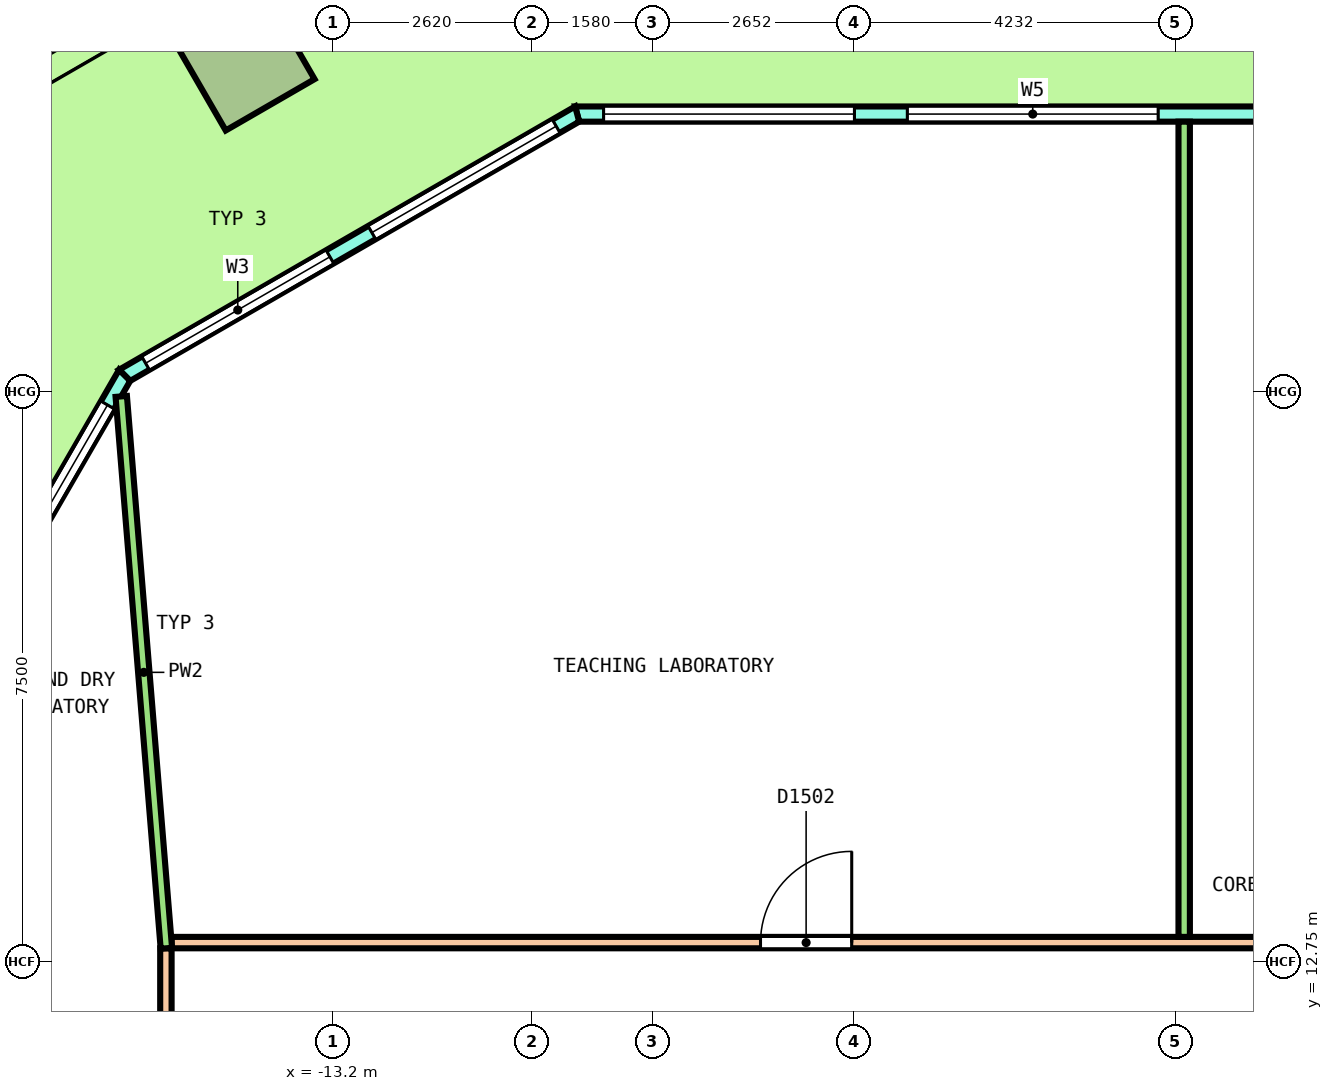
"""IFC4 building model, lengths in metres.
Left out: names, types, materials, properties, quantities, classifications, styles, units other than length and angle.
Written with IfcOpenShell. Run it as: python <this file> out.ifc"""

import sys

from ifc_helpers import new_model, si_unit, direction, frame, frame_2d, origin, origin_2d, place, context, subcontext, project, spatial, polyline, rectangle, outline, extrude, element, fill, save


model = new_model("IFC4")
c1 = context("Model", 3, precision=1e-05, world=origin(), true_north=direction((0.0, 1.0)))
c2 = subcontext(c1, "Body", "Model", "MODEL_VIEW")
j1 = project(units=[si_unit("LENGTHUNIT", "METRE"), si_unit("PLANEANGLEUNIT", "RADIAN")], contexts=[c1])
p1 = place(None, origin())
s1 = spatial("IfcSite", under=j1, at=p1, CompositionType="ELEMENT")
p2 = place(p1, origin())
s2 = spatial("IfcBuilding", under=s1, at=p2, CompositionType="ELEMENT")
p3 = place(p2, frame((0.0, 0.0, 85.2)))
s3 = spatial("IfcBuildingStorey", under=s2, at=p3, CompositionType="ELEMENT", Elevation=85.2)
p4 = place(p3, frame((-14.366, 24.606, 0.0), z_axis=(-0.036205074038, 0.0, 0.999344381389), x_axis=(-0.865315435316, -0.500246354177, -0.031349362627)))
e1 = element("IfcColumn", 1, at=p4, inside=s3, PredefinedType="COLUMN", context=c2, shape_type="SweptSolid", body=[
    extrude(rectangle(XDim=1.35, YDim=1.35, at=origin_2d()), origin(), (0.0, 0.0, 1.0), 4.053),
])
p5 = place(p3, frame((9.989, 23.9, 0.0), z_axis=(0.0, 0.0, 1.0), x_axis=(-1.0, 0.0, 0.0)))
e2 = element("IfcWall", 2, at=p5, inside=s3, PredefinedType="SOLIDWALL", context=c2, shape_type="SweptSolid", body=[
    extrude(outline(polyline([(-0.027, -0.1), (1.028, -0.1), (2.082, -0.1), (3.136, -0.1), (4.19, -0.1), (5.245, -0.1), (6.299, -0.1), (7.354, -0.1), (8.408, -0.1), (9.462, -0.1), (10.516, -0.1), (11.571, -0.1), (12.625, -0.1), (13.679, -0.1), (14.734, -0.1), (15.788, -0.1), (16.842, -0.1), (17.897, -0.1), (18.951, -0.1), (20.005, -0.1), (19.952, 0.1), (18.903, 0.1), (17.854, 0.1), (16.806, 0.1), (15.757, 0.1), (14.708, 0.1), (13.66, 0.1), (12.611, 0.1), (11.562, 0.1), (10.514, 0.1), (9.465, 0.1), (8.416, 0.1), (7.368, 0.1), (6.319, 0.1), (5.27, 0.1), (4.221, 0.1), (3.173, 0.1), (2.124, 0.1), (1.075, 0.1), (0.027, 0.1), (-0.027, -0.1)])), origin(), (0.0, 0.0, 1.0), 4.1),
])
p6 = place(p5, frame((0.348, 0.0, 0.1)))
e3 = element("IfcOpeningElement", 3, at=p6, cuts=e2, PredefinedType="OPENING", context=c2, shape_type="SweptSolid", body=[
    extrude(rectangle(XDim=3.3, YDim=2.9, at=frame_2d((1.65, 1.45))), frame((0.0, 0.11, 0.0), z_axis=(0.0, -1.0, 0.0), x_axis=(1.0, 0.0, 0.0)), (0.0, 0.0, 1.0), 0.22),
])
p7 = place(p5, frame((4.344, 0.0, 0.1)))
e4 = element("IfcOpeningElement", 4, at=p7, cuts=e2, PredefinedType="OPENING", context=c2, shape_type="SweptSolid", body=[
    extrude(rectangle(XDim=3.3, YDim=2.9, at=frame_2d((1.65, 1.45))), frame((0.0, 0.11, 0.0), z_axis=(0.0, -1.0, 0.0), x_axis=(1.0, 0.0, 0.0)), (0.0, 0.0, 1.0), 0.22),
])
p8 = place(p5, frame((9.089, 0.0, 0.0)))
e5 = element("IfcOpeningElement", 5, at=p8, cuts=e2, PredefinedType="OPENING", context=c2, shape_type="SweptSolid", body=[
    extrude(rectangle(XDim=1.8, YDim=2.4, at=frame_2d((0.9, 1.2))), frame((0.0, 0.11, 0.0), z_axis=(0.0, -1.0, 0.0), x_axis=(1.0, 0.0, 0.0)), (0.0, 0.0, 1.0), 0.22),
])
p9 = place(p5, frame((9.089, 0.0, 2.55)))
e6 = element("IfcOpeningElement", 6, at=p9, cuts=e2, PredefinedType="OPENING", context=c2, shape_type="SweptSolid", body=[
    extrude(rectangle(XDim=1.8, YDim=0.45, at=frame_2d((0.9, 0.225))), frame((0.0, 0.11, 0.0), z_axis=(0.0, -1.0, 0.0), x_axis=(1.0, 0.0, 0.0)), (0.0, 0.0, 1.0), 0.22),
])
p10 = place(p5, frame((12.335, 0.0, 0.1)))
e7 = element("IfcOpeningElement", 7, at=p10, cuts=e2, PredefinedType="OPENING", context=c2, shape_type="SweptSolid", body=[
    extrude(rectangle(XDim=3.3, YDim=2.9, at=frame_2d((1.65, 1.45))), frame((0.0, 0.11, 0.0), z_axis=(0.0, -1.0, 0.0), x_axis=(1.0, 0.0, 0.0)), (0.0, 0.0, 1.0), 0.22),
])
p11 = place(p5, frame((16.331, 0.0, 0.1)))
e8 = element("IfcOpeningElement", 8, at=p11, cuts=e2, PredefinedType="OPENING", context=c2, shape_type="SweptSolid", body=[
    extrude(rectangle(XDim=3.3, YDim=2.9, at=frame_2d((1.65, 1.45))), frame((0.0, 0.11, 0.0), z_axis=(0.0, -1.0, 0.0), x_axis=(1.0, 0.0, 0.0)), (0.0, 0.0, 1.0), 0.22),
])
p12 = place(p3, frame((-9.989, 23.9, 0.0), z_axis=(0.0, 0.0, 1.0), x_axis=(-0.866029458321, -0.49999297727, 0.0)))
e9 = element("IfcWall", 9, at=p12, inside=s3, PredefinedType="SOLIDWALL", context=c2, shape_type="SweptSolid", body=[
    extrude(outline(polyline([(-0.027, -0.1), (1.128, -0.1), (2.282, -0.1), (3.437, -0.1), (4.592, -0.1), (5.747, -0.1), (6.901, -0.1), (6.848, 0.1), (5.711, 0.1), (4.574, 0.1), (3.437, 0.1), (2.301, 0.1), (1.164, 0.1), (0.027, 0.1), (-0.027, -0.1)])), origin(), (0.0, 0.0, 1.0), 4.1),
])
p13 = place(p12, frame((0.319, 0.0, 0.1)))
e10 = element("IfcOpeningElement", 10, at=p13, cuts=e9, PredefinedType="OPENING", context=c2, shape_type="SweptSolid", body=[
    extrude(rectangle(XDim=2.8, YDim=2.9, at=frame_2d((1.4, 1.45))), frame((0.0, 0.11, 0.0), z_axis=(0.0, -1.0, 0.0), x_axis=(1.0, 0.0, 0.0)), (0.0, 0.0, 1.0), 0.22),
])
p14 = place(p12, frame((3.756, 0.0, 0.1)))
e11 = element("IfcOpeningElement", 11, at=p14, cuts=e9, PredefinedType="OPENING", context=c2, shape_type="SweptSolid", body=[
    extrude(rectangle(XDim=2.8, YDim=2.9, at=frame_2d((1.4, 1.45))), frame((0.0, 0.11, 0.0), z_axis=(0.0, -1.0, 0.0), x_axis=(1.0, 0.0, 0.0)), (0.0, 0.0, 1.0), 0.22),
])
p15 = place(p3, frame((-15.943, 20.463, 0.0), z_axis=(0.0, 0.0, 1.0), x_axis=(-0.500002434251, -0.866023998365, 0.0)))
e12 = element("IfcWall", 12, at=p15, inside=s3, PredefinedType="SOLIDWALL", context=c2, shape_type="SweptSolid", body=[
    extrude(outline(polyline([(-0.027, -0.1), (1.002, -0.1), (2.031, -0.1), (3.061, -0.1), (4.09, -0.1), (5.119, -0.1), (6.148, -0.1), (7.177, -0.1), (8.206, -0.1), (9.235, -0.1), (10.264, -0.1), (11.293, -0.1), (12.323, -0.1), (13.352, -0.1), (14.381, -0.1), (15.41, -0.1), (16.439, -0.1), (17.468, -0.1), (18.497, -0.1), (19.526, -0.1), (19.473, 0.1), (18.449, 0.1), (17.426, 0.1), (16.402, 0.1), (15.379, 0.1), (14.355, 0.1), (13.332, 0.1), (12.308, 0.1), (11.285, 0.1), (10.261, 0.1), (9.238, 0.1), (8.215, 0.1), (7.191, 0.1), (6.168, 0.1), (5.144, 0.1), (4.121, 0.1), (3.097, 0.1), (2.074, 0.1), (1.05, 0.1), (0.027, 0.1), (-0.027, -0.1)])), origin(), (0.0, 0.0, 1.0), 4.1),
])
p16 = place(p15, frame((0.45, 0.0, 0.1)))
e13 = element("IfcOpeningElement", 13, at=p16, cuts=e12, PredefinedType="OPENING", context=c2, shape_type="SweptSolid", body=[
    extrude(rectangle(XDim=3.0, YDim=2.9, at=frame_2d((1.5, 1.45))), frame((0.0, 0.11, 0.0), z_axis=(0.0, -1.0, 0.0), x_axis=(1.0, 0.0, 0.0)), (0.0, 0.0, 1.0), 0.22),
])
p17 = place(p15, frame((4.35, 0.0, 0.1)))
e14 = element("IfcOpeningElement", 14, at=p17, cuts=e12, PredefinedType="OPENING", context=c2, shape_type="SweptSolid", body=[
    extrude(rectangle(XDim=3.0, YDim=2.9, at=frame_2d((1.5, 1.45))), frame((0.0, 0.11, 0.0), z_axis=(0.0, -1.0, 0.0), x_axis=(1.0, 0.0, 0.0)), (0.0, 0.0, 1.0), 0.22),
])
p18 = place(p15, frame((8.85, 0.0, 0.0)))
e15 = element("IfcOpeningElement", 15, at=p18, cuts=e12, PredefinedType="OPENING", context=c2, shape_type="SweptSolid", body=[
    extrude(rectangle(XDim=1.8, YDim=2.4, at=frame_2d((0.9, 1.2))), frame((0.0, 0.11, 0.0), z_axis=(0.0, -1.0, 0.0), x_axis=(1.0, 0.0, 0.0)), (0.0, 0.0, 1.0), 0.22),
])
p19 = place(p15, frame((8.85, 0.0, 2.55)))
e16 = element("IfcOpeningElement", 16, at=p19, cuts=e12, PredefinedType="OPENING", context=c2, shape_type="SweptSolid", body=[
    extrude(rectangle(XDim=1.8, YDim=0.45, at=frame_2d((0.9, 0.225))), frame((0.0, 0.11, 0.0), z_axis=(0.0, -1.0, 0.0), x_axis=(1.0, 0.0, 0.0)), (0.0, 0.0, 1.0), 0.22),
])
p20 = place(p15, frame((12.15, 0.0, 0.1)))
e17 = element("IfcOpeningElement", 17, at=p20, cuts=e12, PredefinedType="OPENING", context=c2, shape_type="SweptSolid", body=[
    extrude(rectangle(XDim=3.0, YDim=2.9, at=frame_2d((1.5, 1.45))), frame((0.0, 0.11, 0.0), z_axis=(0.0, -1.0, 0.0), x_axis=(1.0, 0.0, 0.0)), (0.0, 0.0, 1.0), 0.22),
])
p21 = place(p15, frame((16.05, 0.0, 0.1)))
e18 = element("IfcOpeningElement", 18, at=p21, cuts=e12, PredefinedType="OPENING", context=c2, shape_type="SweptSolid", body=[
    extrude(rectangle(XDim=3.0, YDim=2.9, at=frame_2d((1.5, 1.45))), frame((0.0, 0.11, 0.0), z_axis=(0.0, -1.0, 0.0), x_axis=(1.0, 0.0, 0.0)), (0.0, 0.0, 1.0), 0.22),
])
p22 = place(p3, frame((-15.325, 13.0, 0.0), z_axis=(0.0, 0.0, 1.0), x_axis=(1.0, 0.0, 0.0)))
e19 = element("IfcWall", 19, at=p22, inside=s3, PredefinedType="PARTITIONING", context=c2, shape_type="SweptSolid", body=[
    extrude(rectangle(XDim=30.675, YDim=0.15, at=frame_2d((15.337, 0.0))), origin(), (0.0, 0.0, 1.0), 3.05),
])
p23 = place(p22, frame((29.033, 0.0, 0.0)))
e20 = element("IfcOpeningElement", 20, at=p23, cuts=e19, PredefinedType="OPENING", context=c2, shape_type="SweptSolid", body=[
    extrude(rectangle(XDim=1.0, YDim=2.1, at=frame_2d((0.5, 1.05))), frame((0.0, 0.085, 0.0), z_axis=(0.0, -1.0, 0.0), x_axis=(1.0, 0.0, 0.0)), (0.0, 0.0, 1.0), 0.17),
])
p24 = place(p22, frame((23.661, 0.0, 0.0)))
e21 = element("IfcOpeningElement", 21, at=p24, cuts=e19, PredefinedType="OPENING", context=c2, shape_type="SweptSolid", body=[
    extrude(rectangle(XDim=1.0, YDim=2.1, at=frame_2d((0.5, 1.05))), frame((0.0, 0.085, 0.0), z_axis=(0.0, -1.0, 0.0), x_axis=(1.0, 0.0, 0.0)), (0.0, 0.0, 1.0), 0.17),
])
p25 = place(p22, frame((7.748, 0.0, 0.0)))
e22 = element("IfcOpeningElement", 22, at=p25, cuts=e19, PredefinedType="OPENING", context=c2, shape_type="SweptSolid", body=[
    extrude(rectangle(XDim=1.2, YDim=2.1, at=frame_2d((0.6, 1.05))), frame((0.0, 0.085, 0.0), z_axis=(0.0, -1.0, 0.0), x_axis=(1.0, 0.0, 0.0)), (0.0, 0.0, 1.0), 0.17),
])
p26 = place(p3, frame((-15.4, -12.925, 0.0), z_axis=(0.0, 0.0, 1.0), x_axis=(0.0, 1.0, 0.0)))
e23 = element("IfcWall", 23, at=p26, inside=s3, PredefinedType="PARTITIONING", context=c2, shape_type="SweptSolid", body=[
    extrude(rectangle(XDim=25.85, YDim=0.15, at=frame_2d((12.925, 0.0))), origin(), (0.0, 0.0, 1.0), 3.05),
])
p27 = place(p26, frame((21.292, 0.0, 0.0)))
e24 = element("IfcOpeningElement", 24, at=p27, cuts=e23, PredefinedType="OPENING", context=c2, shape_type="SweptSolid", body=[
    extrude(rectangle(XDim=1.2, YDim=2.1, at=frame_2d((0.6, 1.05))), frame((0.0, 0.085, 0.0), z_axis=(0.0, -1.0, 0.0), x_axis=(1.0, 0.0, 0.0)), (0.0, 0.0, 1.0), 0.17),
])
p28 = place(p26, frame((15.393, 0.0, 0.0)))
e25 = element("IfcOpeningElement", 25, at=p28, cuts=e23, PredefinedType="OPENING", context=c2, shape_type="SweptSolid", body=[
    extrude(rectangle(XDim=1.2, YDim=2.1, at=frame_2d((0.6, 1.05))), frame((0.0, 0.085, 0.0), z_axis=(0.0, -1.0, 0.0), x_axis=(1.0, 0.0, 0.0)), (0.0, 0.0, 1.0), 0.17),
])
p29 = place(p26, frame((3.503, 0.0, 0.0)))
e26 = element("IfcOpeningElement", 26, at=p29, cuts=e23, PredefinedType="OPENING", context=c2, shape_type="SweptSolid", body=[
    extrude(rectangle(XDim=1.2, YDim=2.1, at=frame_2d((0.6, 1.05))), frame((0.0, 0.085, 0.0), z_axis=(0.0, -1.0, 0.0), x_axis=(1.0, 0.0, 0.0)), (0.0, 0.0, 1.0), 0.17),
])
p30 = place(p3, frame((-2.003, 13.075, 0.0), z_axis=(0.0, 0.0, 1.0), x_axis=(0.0, 1.0, 0.0)))
e27 = element("IfcWall", 27, at=p30, inside=s3, PredefinedType="PARTITIONING", context=c2, shape_type="SweptSolid", body=[
    extrude(rectangle(XDim=10.725, YDim=0.15, at=frame_2d((5.363, 0.0))), origin(), (0.0, 0.0, 1.0), 3.05),
])
p31 = place(p3, frame((-15.987, 20.186, 0.0), z_axis=(0.0, 0.0, 1.0), x_axis=(0.081475478093, -0.996675346575, 0.0)))
e28 = element("IfcWall", 28, at=p31, inside=s3, PredefinedType="PARTITIONING", context=c2, shape_type="SweptSolid", body=[
    extrude(rectangle(XDim=7.284, YDim=0.15, at=frame_2d((3.642, 0.0))), origin(), (0.0, 0.0, 1.0), 3.05),
])
p32 = place(p10, origin())
e29 = element("IfcWindow", 29, at=p32, inside=s3, PartitioningType="SINGLE_PANEL", PredefinedType="WINDOW", context=c2, shape_type="SweptSolid", body=[
    extrude(rectangle(XDim=3.3, YDim=2.9, at=frame_2d((1.65, 1.45))), frame((0.0, 0.03, 0.0), z_axis=(0.0, -1.0, 0.0), x_axis=(1.0, 0.0, 0.0)), (0.0, 0.0, 1.0), 0.06),
])
fill(e7, e29)
p33 = place(p11, origin())
e30 = element("IfcWindow", 30, at=p33, inside=s3, PartitioningType="SINGLE_PANEL", PredefinedType="WINDOW", context=c2, shape_type="SweptSolid", body=[
    extrude(rectangle(XDim=3.3, YDim=2.9, at=frame_2d((1.65, 1.45))), frame((0.0, 0.03, 0.0), z_axis=(0.0, -1.0, 0.0), x_axis=(1.0, 0.0, 0.0)), (0.0, 0.0, 1.0), 0.06),
])
fill(e8, e30)
p34 = place(p13, origin())
e31 = element("IfcWindow", 31, at=p34, inside=s3, PartitioningType="SINGLE_PANEL", PredefinedType="WINDOW", context=c2, shape_type="SweptSolid", body=[
    extrude(rectangle(XDim=2.8, YDim=2.9, at=frame_2d((1.4, 1.45))), frame((0.0, 0.03, 0.0), z_axis=(0.0, -1.0, 0.0), x_axis=(1.0, 0.0, 0.0)), (0.0, 0.0, 1.0), 0.06),
])
fill(e10, e31)
p35 = place(p14, origin())
e32 = element("IfcWindow", 32, at=p35, inside=s3, PartitioningType="SINGLE_PANEL", PredefinedType="WINDOW", context=c2, shape_type="SweptSolid", body=[
    extrude(rectangle(XDim=2.8, YDim=2.9, at=frame_2d((1.4, 1.45))), frame((0.0, 0.03, 0.0), z_axis=(0.0, -1.0, 0.0), x_axis=(1.0, 0.0, 0.0)), (0.0, 0.0, 1.0), 0.06),
])
fill(e11, e32)
p36 = place(p16, origin())
e33 = element("IfcWindow", 33, at=p36, inside=s3, PartitioningType="SINGLE_PANEL", PredefinedType="WINDOW", context=c2, shape_type="SweptSolid", body=[
    extrude(rectangle(XDim=3.0, YDim=2.9, at=frame_2d((1.5, 1.45))), frame((0.0, 0.03, 0.0), z_axis=(0.0, -1.0, 0.0), x_axis=(1.0, 0.0, 0.0)), (0.0, 0.0, 1.0), 0.06),
])
fill(e13, e33)
p37 = place(p25, origin())
e34 = element("IfcDoor", 34, at=p37, inside=s3, OperationType="DOUBLE_DOOR_SINGLE_SWING", PredefinedType="DOOR", context=c2, shape_type="SweptSolid", body=[
    extrude(rectangle(XDim=1.2, YDim=2.1, at=frame_2d((0.6, 1.05))), frame((0.0, 0.025, 0.0), z_axis=(0.0, -1.0, 0.0), x_axis=(1.0, 0.0, 0.0)), (0.0, 0.0, 1.0), 0.05),
])
fill(e22, e34)
save(model, sys.argv[1])
